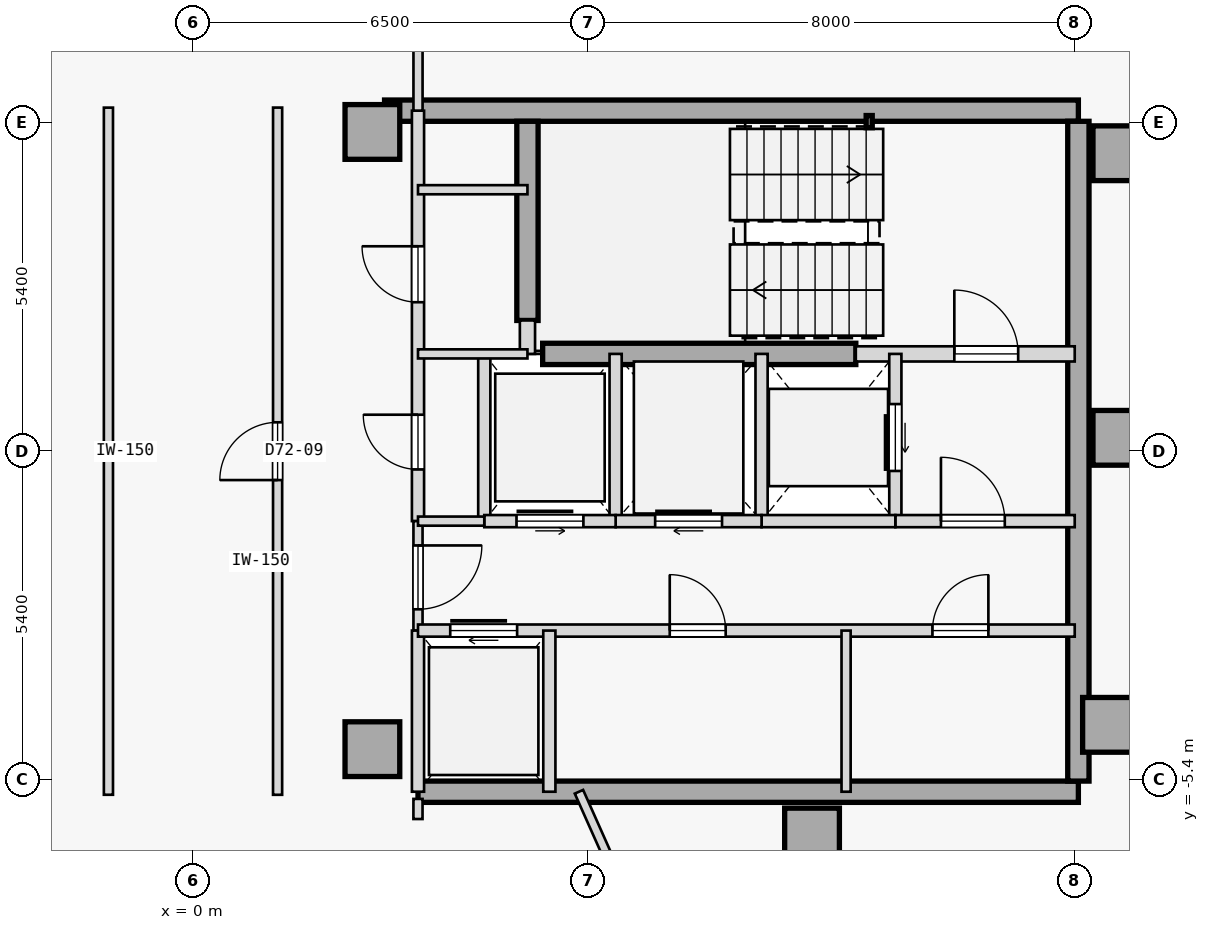
"""IFC4 building model, lengths in metres.
Left out: names, types, materials, properties, quantities, classifications, styles, units other than length and angle.
Written with IfcOpenShell. Run it as: python <this file> out.ifc"""

import sys

from ifc_helpers import new_model, si_unit, direction, frame, frame_2d, origin, origin_2d, place, context, subcontext, project, spatial, rectangle, hollow_rectangle, extrude, element, fill, save


model = new_model("IFC4")
c1 = context("Model", 3, precision=1e-05, world=origin(), true_north=direction((0.0, 1.0)))
c2 = subcontext(c1, "Body", "Model", "MODEL_VIEW")
j1 = project(units=[si_unit("LENGTHUNIT", "METRE"), si_unit("PLANEANGLEUNIT", "RADIAN")], contexts=[c1])
p1 = place(None, origin())
s1 = spatial("IfcSite", under=j1, at=p1, CompositionType="ELEMENT")
p2 = place(p1, origin())
s2 = spatial("IfcBuilding", under=s1, at=p2, CompositionType="ELEMENT")
p3 = place(p2, frame((0.0, 0.0, 268.9)))
s3 = spatial("IfcBuildingStorey", under=s2, at=p3, CompositionType="ELEMENT", Elevation=268.9)
for number, where, z_axis, x_axis in (
    (1, (15.25, 4.9, 0.0), (0.0, 0.0, 1.0), (1.0, 0.0, 0.0)),
    (2, (15.25, 0.22, 0.0), (0.0, 0.0, 1.0), (1.0, 0.0, 0.0)),
    (3, (15.08, -4.5, 0.0), (0.0, 0.0, 1.0), (1.0, 0.0, 0.0)),
    (4, (10.18, -6.32, 0.0), (0.0, 0.0, 1.0), (1.0, 0.0, 0.0)),
    (5, (2.95, -4.9, 0.0), (0.0, 0.0, 1.0), (1.0, 0.0, 0.0)),
    (6, (2.95, 5.25, 0.0), (0.0, 0.0, 1.0), (1.0, 0.0, 0.0)),
):
    element("IfcColumn", number, at=place(p3, frame(where, z_axis=z_axis, x_axis=x_axis)), inside=s3, PredefinedType="COLUMN", context=c2, shape_type="SweptSolid", body=[
        extrude(rectangle(XDim=0.9, YDim=0.9, at=origin_2d()), origin(), (0.0, 0.0, 1.0), 3.35),
    ])
p4 = place(p3, frame((3.15, 5.6, 0.0), z_axis=(0.0, 0.0, 1.0), x_axis=(1.0, 0.0, 0.0)))
e7 = element("IfcWall", 7, at=p4, inside=s3, PredefinedType="SHEAR", context=c2, shape_type="SweptSolid", body=[
    extrude(rectangle(XDim=11.41, YDim=0.35, at=frame_2d((5.705, 0.0))), origin(), (0.0, 0.0, 1.0), 3.125),
])
p5 = place(p3, frame((3.7, -5.6, 0.0), z_axis=(0.0, 0.0, 1.0), x_axis=(1.0, 0.0, 0.0)))
e8 = element("IfcWall", 8, at=p5, inside=s3, PredefinedType="SHEAR", context=c2, shape_type="SweptSolid", body=[
    extrude(rectangle(XDim=10.86, YDim=0.35, at=frame_2d((5.43, 0.0))), origin(), (0.0, 0.0, 1.0), 3.125),
])
p6 = place(p3, frame((14.56, -5.425, 0.0), z_axis=(0.0, 0.0, 1.0), x_axis=(0.0, 1.0, 0.0)))
e9 = element("IfcWall", 9, at=p6, inside=s3, PredefinedType="SHEAR", context=c2, shape_type="SweptSolid", body=[
    extrude(rectangle(XDim=10.85, YDim=0.35, at=frame_2d((5.425, 0.0))), origin(), (0.0, 0.0, 1.0), 3.125),
])
p7 = place(p3, frame((5.5, 2.15, 0.0), z_axis=(0.0, 0.0, 1.0), x_axis=(0.0, 1.0, 0.0)))
e10 = element("IfcWall", 10, at=p7, inside=s3, PredefinedType="SHEAR", context=c2, shape_type="SweptSolid", body=[
    extrude(rectangle(XDim=3.275, YDim=0.35, at=frame_2d((1.638, 0.0))), origin(), (0.0, 0.0, 1.0), 3.125),
])
p8 = place(p3, frame((5.75, 1.6, 0.0), z_axis=(0.0, 0.0, 1.0), x_axis=(1.0, 0.0, 0.0)))
e11 = element("IfcWall", 11, at=p8, inside=s3, PredefinedType="SHEAR", context=c2, shape_type="SweptSolid", body=[
    extrude(rectangle(XDim=5.15, YDim=0.35, at=frame_2d((2.575, 0.0))), origin(), (0.0, 0.0, 1.0), 3.125),
])
p9 = place(p3, frame((11.12, 5.42, 0.0), z_axis=(0.0, 0.0, 1.0), x_axis=(1.0, 0.0, 0.0)))
e12 = element("IfcColumn", 12, at=p9, inside=s3, PredefinedType="COLUMN", context=c2, shape_type="SweptSolid", body=[
    extrude(hollow_rectangle(XDim=0.1, YDim=0.2, WallThickness=0.008, at=origin_2d()), origin(), (0.0, 0.0, 1.0), 3.35),
])
p10 = place(p3, frame((10.9, 1.6, 0.0), z_axis=(0.0, 0.0, 1.0), x_axis=(1.0, 0.0, 0.0)))
e13 = element("IfcWall", 13, at=p10, inside=s3, PredefinedType="STANDARD", context=c2, shape_type="SweptSolid", body=[
    extrude(rectangle(XDim=3.6, YDim=0.25, at=frame_2d((1.8, 0.0))), origin(), (0.0, 0.0, 1.0), 3.125),
])
p11 = place(p10, frame((1.62, 0.0, 0.0)))
e14 = element("IfcOpeningElement", 14, at=p11, cuts=e13, PredefinedType="OPENING", context=c2, shape_type="SweptSolid", body=[
    extrude(rectangle(XDim=1.05, YDim=2.15, at=frame_2d((0.525, 1.075))), frame((0.0, 0.135, 0.0), z_axis=(0.0, -1.0, 0.0), x_axis=(1.0, 0.0, 0.0)), (0.0, 0.0, 1.0), 0.27),
])
p12 = place(p3, frame((5.5, 1.6, 0.0), z_axis=(0.0, 0.0, 1.0), x_axis=(0.0, 1.0, 0.0)))
e15 = element("IfcWall", 15, at=p12, inside=s3, PredefinedType="STANDARD", context=c2, shape_type="SweptSolid", body=[
    extrude(rectangle(XDim=0.55, YDim=0.25, at=frame_2d((0.275, 0.0))), origin(), (0.0, 0.0, 1.0), 3.125),
])
p13 = place(p3, frame((3.7, -1.15, 0.0), z_axis=(0.0, 0.0, 1.0), x_axis=(0.0, 1.0, 0.0)))
e16 = element("IfcWall", 16, at=p13, inside=s3, PredefinedType="STANDARD", context=c2, shape_type="SweptSolid", body=[
    extrude(rectangle(XDim=6.75, YDim=0.2, at=frame_2d((3.375, 0.0))), origin(), (0.0, 0.0, 1.0), 3.125),
])
p14 = place(p13, frame((3.6, 0.0, 0.0)))
e17 = element("IfcOpeningElement", 17, at=p14, cuts=e16, PredefinedType="OPENING", context=c2, shape_type="SweptSolid", body=[
    extrude(rectangle(XDim=0.92, YDim=2.15, at=frame_2d((0.46, 1.075))), frame((0.0, 0.11, 0.0), z_axis=(0.0, -1.0, 0.0), x_axis=(1.0, 0.0, 0.0)), (0.0, 0.0, 1.0), 0.22),
])
p15 = place(p13, frame((0.85, 0.0, 0.0)))
e18 = element("IfcOpeningElement", 18, at=p15, cuts=e16, PredefinedType="OPENING", context=c2, shape_type="SweptSolid", body=[
    extrude(rectangle(XDim=0.9, YDim=2.15, at=frame_2d((0.45, 1.075))), frame((0.0, 0.11, 0.0), z_axis=(0.0, -1.0, 0.0), x_axis=(1.0, 0.0, 0.0)), (0.0, 0.0, 1.0), 0.22),
])
p16 = place(p3, frame((3.7, -2.95, 0.0), z_axis=(0.0, 0.0, 1.0), x_axis=(0.0, 1.0, 0.0)))
e19 = element("IfcWall", 19, at=p16, inside=s3, PredefinedType="PARTITIONING", context=c2, shape_type="SweptSolid", body=[
    extrude(rectangle(XDim=1.8, YDim=0.15, at=frame_2d((0.9, 0.0))), origin(), (0.0, 0.0, 1.0), 3.125),
])
p17 = place(p16, frame((0.35, 0.0, 0.0)))
e20 = element("IfcOpeningElement", 20, at=p17, cuts=e19, PredefinedType="OPENING", context=c2, shape_type="SweptSolid", body=[
    extrude(rectangle(XDim=1.05, YDim=2.18, at=frame_2d((0.525, 1.09))), frame((0.0, 0.085, 0.0), z_axis=(0.0, -1.0, 0.0), x_axis=(1.0, 0.0, 0.0)), (0.0, 0.0, 1.0), 0.17),
])
p18 = place(p3, frame((3.7, -5.6, 0.0), z_axis=(0.0, 0.0, 1.0), x_axis=(0.0, 1.0, 0.0)))
e21 = element("IfcWall", 21, at=p18, inside=s3, PredefinedType="STANDARD", context=c2, shape_type="SweptSolid", body=[
    extrude(rectangle(XDim=2.65, YDim=0.2, at=frame_2d((1.325, 0.0))), origin(), (0.0, 0.0, 1.0), 3.125),
])
p19 = place(p3, frame((11.55, -1.15, 0.0), z_axis=(0.0, 0.0, 1.0), x_axis=(0.0, 1.0, 0.0)))
e22 = element("IfcWall", 22, at=p19, inside=s3, PredefinedType="STANDARD", context=c2, shape_type="SweptSolid", body=[
    extrude(rectangle(XDim=2.75, YDim=0.2, at=frame_2d((1.375, 0.0))), origin(), (0.0, 0.0, 1.0), 3.125),
])
p20 = place(p19, frame((0.825, 0.0, 0.0)))
e23 = element("IfcOpeningElement", 23, at=p20, cuts=e22, PredefinedType="OPENING", context=c2, shape_type="SweptSolid", body=[
    extrude(rectangle(XDim=1.1, YDim=2.15, at=frame_2d((0.55, 1.075))), frame((0.0, 0.11, 0.0), z_axis=(0.0, -1.0, 0.0), x_axis=(1.0, 0.0, 0.0)), (0.0, 0.0, 1.0), 0.22),
])
p21 = place(p3, frame((9.35, -1.15, 0.0), z_axis=(0.0, 0.0, 1.0), x_axis=(0.0, 1.0, 0.0)))
e24 = element("IfcWall", 24, at=p21, inside=s3, PredefinedType="STANDARD", context=c2, shape_type="SweptSolid", body=[
    extrude(rectangle(XDim=2.75, YDim=0.2, at=frame_2d((1.375, 0.0))), origin(), (0.0, 0.0, 1.0), 3.125),
])
p22 = place(p3, frame((11.55, -1.15, 0.0), z_axis=(0.0, 0.0, 1.0), x_axis=(1.0, 0.0, 0.0)))
e25 = element("IfcWall", 25, at=p22, inside=s3, PredefinedType="STANDARD", context=c2, shape_type="SweptSolid", body=[
    extrude(rectangle(XDim=2.95, YDim=0.2, at=frame_2d((1.475, 0.0))), origin(), (0.0, 0.0, 1.0), 3.125),
])
p23 = place(p22, frame((0.75, 0.0, 0.0)))
e26 = element("IfcOpeningElement", 26, at=p23, cuts=e25, PredefinedType="OPENING", context=c2, shape_type="SweptSolid", body=[
    extrude(rectangle(XDim=1.05, YDim=2.18, at=frame_2d((0.525, 1.09))), frame((0.0, 0.11, 0.0), z_axis=(0.0, -1.0, 0.0), x_axis=(1.0, 0.0, 0.0)), (0.0, 0.0, 1.0), 0.22),
])
p24 = place(p3, frame((9.35, -1.15, 0.0), z_axis=(0.0, 0.0, 1.0), x_axis=(1.0, 0.0, 0.0)))
e27 = element("IfcWall", 27, at=p24, inside=s3, PredefinedType="STANDARD", context=c2, shape_type="SweptSolid", body=[
    extrude(rectangle(XDim=2.2, YDim=0.2, at=frame_2d((1.1, 0.0))), origin(), (0.0, 0.0, 1.0), 3.125),
])
p25 = place(p3, frame((6.95, -1.15, 0.0), z_axis=(0.0, 0.0, 1.0), x_axis=(0.0, 1.0, 0.0)))
e28 = element("IfcWall", 28, at=p25, inside=s3, PredefinedType="STANDARD", context=c2, shape_type="SweptSolid", body=[
    extrude(rectangle(XDim=2.75, YDim=0.2, at=frame_2d((1.375, 0.0))), origin(), (0.0, 0.0, 1.0), 3.125),
])
p26 = place(p3, frame((6.95, -1.15, 0.0), z_axis=(0.0, 0.0, 1.0), x_axis=(1.0, 0.0, 0.0)))
e29 = element("IfcWall", 29, at=p26, inside=s3, PredefinedType="STANDARD", context=c2, shape_type="SweptSolid", body=[
    extrude(rectangle(XDim=2.4, YDim=0.2, at=frame_2d((1.2, 0.0))), origin(), (0.0, 0.0, 1.0), 3.125),
])
p27 = place(p26, frame((0.65, 0.0, 0.0)))
e30 = element("IfcOpeningElement", 30, at=p27, cuts=e29, PredefinedType="OPENING", context=c2, shape_type="SweptSolid", body=[
    extrude(rectangle(XDim=1.1, YDim=2.15, at=frame_2d((0.55, 1.075))), frame((0.0, 0.11, 0.0), z_axis=(0.0, -1.0, 0.0), x_axis=(1.0, 0.0, 0.0)), (0.0, 0.0, 1.0), 0.22),
])
p28 = place(p3, frame((4.79, -1.15, 0.0), z_axis=(0.0, 0.0, 1.0), x_axis=(0.0, 1.0, 0.0)))
e31 = element("IfcWall", 31, at=p28, inside=s3, PredefinedType="STANDARD", context=c2, shape_type="SweptSolid", body=[
    extrude(rectangle(XDim=2.75, YDim=0.2, at=frame_2d((1.375, 0.0))), origin(), (0.0, 0.0, 1.0), 3.125),
])
p29 = place(p3, frame((4.79, -1.15, 0.0), z_axis=(0.0, 0.0, 1.0), x_axis=(1.0, 0.0, 0.0)))
e32 = element("IfcWall", 32, at=p29, inside=s3, PredefinedType="STANDARD", context=c2, shape_type="SweptSolid", body=[
    extrude(rectangle(XDim=2.16, YDim=0.2, at=frame_2d((1.08, 0.0))), origin(), (0.0, 0.0, 1.0), 3.125),
])
p30 = place(p29, frame((0.53, 0.0, 0.0)))
e33 = element("IfcOpeningElement", 33, at=p30, cuts=e32, PredefinedType="OPENING", context=c2, shape_type="SweptSolid", body=[
    extrude(rectangle(XDim=1.1, YDim=2.15, at=frame_2d((0.55, 1.075))), frame((0.0, 0.11, 0.0), z_axis=(0.0, -1.0, 0.0), x_axis=(1.0, 0.0, 0.0)), (0.0, 0.0, 1.0), 0.22),
])
p31 = place(p3, frame((3.7, -1.15, 0.0), z_axis=(0.0, 0.0, 1.0), x_axis=(1.0, 0.0, 0.0)))
e34 = element("IfcWall", 34, at=p31, inside=s3, PredefinedType="PARTITIONING", context=c2, shape_type="SweptSolid", body=[
    extrude(rectangle(XDim=1.09, YDim=0.15, at=frame_2d((0.545, 0.0))), origin(), (0.0, 0.0, 1.0), 3.125),
])
p32 = place(p3, frame((3.7, -2.95, 0.0), z_axis=(0.0, 0.0, 1.0), x_axis=(1.0, 0.0, 0.0)))
e35 = element("IfcWall", 35, at=p32, inside=s3, PredefinedType="STANDARD", context=c2, shape_type="SweptSolid", body=[
    extrude(rectangle(XDim=10.8, YDim=0.2, at=frame_2d((5.4, 0.0))), origin(), (0.0, 0.0, 1.0), 3.125),
])
p33 = place(p32, frame((0.53, 0.0, 0.0)))
e36 = element("IfcOpeningElement", 36, at=p33, cuts=e35, PredefinedType="OPENING", context=c2, shape_type="SweptSolid", body=[
    extrude(rectangle(XDim=1.1, YDim=2.15, at=frame_2d((0.55, 1.075))), frame((0.0, 0.11, 0.0), z_axis=(0.0, -1.0, 0.0), x_axis=(1.0, 0.0, 0.0)), (0.0, 0.0, 1.0), 0.22),
])
p34 = place(p32, frame((4.14, 0.0, 0.0)))
e37 = element("IfcOpeningElement", 37, at=p34, cuts=e35, PredefinedType="OPENING", context=c2, shape_type="SweptSolid", body=[
    extrude(rectangle(XDim=0.92, YDim=2.15, at=frame_2d((0.46, 1.075))), frame((0.0, 0.11, 0.0), z_axis=(0.0, -1.0, 0.0), x_axis=(1.0, 0.0, 0.0)), (0.0, 0.0, 1.0), 0.22),
])
p35 = place(p32, frame((8.46, 0.0, 0.0)))
e38 = element("IfcOpeningElement", 38, at=p35, cuts=e35, PredefinedType="OPENING", context=c2, shape_type="SweptSolid", body=[
    extrude(rectangle(XDim=0.92, YDim=2.15, at=frame_2d((0.46, 1.075))), frame((0.0, 0.11, 0.0), z_axis=(0.0, -1.0, 0.0), x_axis=(1.0, 0.0, 0.0)), (0.0, 0.0, 1.0), 0.22),
])
p36 = place(p3, frame((5.86, -5.6, 0.0), z_axis=(0.0, 0.0, 1.0), x_axis=(0.0, 1.0, 0.0)))
e39 = element("IfcWall", 39, at=p36, inside=s3, PredefinedType="STANDARD", context=c2, shape_type="SweptSolid", body=[
    extrude(rectangle(XDim=2.65, YDim=0.2, at=frame_2d((1.325, 0.0))), origin(), (0.0, 0.0, 1.0), 3.125),
])
p37 = place(p3, frame((10.74, -5.6, 0.0), z_axis=(0.0, 0.0, 1.0), x_axis=(0.0, 1.0, 0.0)))
e40 = element("IfcWall", 40, at=p37, inside=s3, PredefinedType="PARTITIONING", context=c2, shape_type="SweptSolid", body=[
    extrude(rectangle(XDim=2.65, YDim=0.15, at=frame_2d((1.325, 0.0))), origin(), (0.0, 0.0, 1.0), 3.125),
])
for number, where, z_axis, x_axis in (
    (41, (3.7, 4.3, 0.0), (0.0, 0.0, 1.0), (1.0, 0.0, 0.0)),
    (42, (3.7, 1.6, 0.0), (0.0, 0.0, 1.0), (1.0, 0.0, 0.0)),
):
    element("IfcWall", number, at=place(p3, frame(where, z_axis=z_axis, x_axis=x_axis)), inside=s3, PredefinedType="PARTITIONING", context=c2, shape_type="SweptSolid", body=[
        extrude(rectangle(XDim=1.8, YDim=0.15, at=frame_2d((0.9, 0.0))), origin(), (0.0, 0.0, 1.0), 3.125),
    ])
p38 = place(p3, frame((-1.391, -5.65, 0.0), z_axis=(0.0, 0.0, 1.0), x_axis=(-2.1605738e-05, 0.999999999767, 0.0)))
e43 = element("IfcWall", 43, at=p38, inside=s3, PredefinedType="PARTITIONING", context=c2, shape_type="SweptSolid", body=[
    extrude(rectangle(XDim=11.3, YDim=0.15, at=frame_2d((5.65, 0.0))), origin(), (0.0, 0.0, 1.0), 3.125),
])
p39 = place(p3, frame((1.391, -5.65, 0.0), z_axis=(0.0, 0.0, 1.0), x_axis=(4.3206809e-05, 0.999999999067, 0.0)))
e44 = element("IfcWall", 44, at=p39, inside=s3, PredefinedType="PARTITIONING", context=c2, shape_type="SweptSolid", body=[
    extrude(rectangle(XDim=11.301, YDim=0.15, at=frame_2d((5.65, 0.0))), origin(), (0.0, 0.0, 1.0), 3.125),
])
p40 = place(p39, frame((5.176, 0.0, 0.0)))
e45 = element("IfcOpeningElement", 45, at=p40, cuts=e44, PredefinedType="OPENING", context=c2, shape_type="SweptSolid", body=[
    extrude(rectangle(XDim=0.95, YDim=2.15, at=frame_2d((0.475, 1.075))), frame((0.0, 0.085, 0.0), z_axis=(0.0, -1.0, 0.0), x_axis=(1.0, 0.0, 0.0)), (0.0, 0.0, 1.0), 0.17),
])
p41 = place(p3, frame((3.699, -6.049, 0.0), z_axis=(0.0, 0.0, 1.0), x_axis=(0.001476013152, 0.999998910692, 0.0)))
e46 = element("IfcWall", 46, at=p41, inside=s3, PredefinedType="PARTITIONING", context=c2, shape_type="SweptSolid", body=[
    extrude(rectangle(XDim=0.331, YDim=0.15, at=frame_2d((0.166, 0.0))), origin(), (0.0, 0.0, 1.0), 3.125),
])
p42 = place(p3, frame((3.7, 5.601, 0.0), z_axis=(0.0, 0.0, 1.0), x_axis=(0.0, 1.0, 0.0)))
e47 = element("IfcWall", 47, at=p42, inside=s3, PredefinedType="PARTITIONING", context=c2, shape_type="SweptSolid", body=[
    extrude(rectangle(XDim=3.713, YDim=0.15, at=frame_2d((1.856, 0.0))), origin(), (0.0, 0.0, 1.0), 3.125),
])
p43 = place(p42, frame((1.396, 0.0, 0.0)))
e48 = element("IfcOpeningElement", 48, at=p43, cuts=e47, PredefinedType="OPENING", context=c2, shape_type="SweptSolid", body=[
    extrude(rectangle(XDim=0.92, YDim=2.15, at=frame_2d((0.46, 1.075))), frame((0.0, 0.085, 0.0), z_axis=(0.0, -1.0, 0.0), x_axis=(1.0, 0.0, 0.0)), (0.0, 0.0, 1.0), 0.17),
])
p44 = place(p3, frame((7.696, -8.63, 0.0), z_axis=(0.0, 0.0, 1.0), x_axis=(-0.406773661192, 0.913528975217, 0.0)))
e49 = element("IfcWall", 49, at=p44, inside=s3, PredefinedType="PARTITIONING", context=c2, shape_type="SweptSolid", body=[
    extrude(rectangle(XDim=3.316, YDim=0.15, at=frame_2d((1.658, 0.0))), origin(), (0.0, 0.0, 1.0), 3.125),
])
p45 = place(p11, origin())
e50 = element("IfcDoor", 50, at=p45, inside=s3, OperationType="SINGLE_SWING_LEFT", PredefinedType="DOOR", context=c2, shape_type="SweptSolid", body=[
    extrude(rectangle(XDim=1.05, YDim=2.15, at=frame_2d((0.525, 1.075))), frame((0.0, 0.025, 0.0), z_axis=(0.0, -1.0, 0.0), x_axis=(1.0, 0.0, 0.0)), (0.0, 0.0, 1.0), 0.05),
])
fill(e14, e50)
p46 = place(p23, origin())
e51 = element("IfcDoor", 51, at=p46, inside=s3, OperationType="SINGLE_SWING_LEFT", PredefinedType="DOOR", context=c2, shape_type="SweptSolid", body=[
    extrude(rectangle(XDim=1.05, YDim=2.18, at=frame_2d((0.525, 1.09))), frame((0.0, 0.025, 0.0), z_axis=(0.0, -1.0, 0.0), x_axis=(1.0, 0.0, 0.0)), (0.0, 0.0, 1.0), 0.05),
])
fill(e26, e51)
p47 = place(p17, frame((1.05, 0.0, 0.0), z_axis=(0.0, 0.0, 1.0), x_axis=(-1.0, 0.0, 0.0)))
e52 = element("IfcDoor", 52, at=p47, inside=s3, OperationType="SINGLE_SWING_RIGHT", PredefinedType="DOOR", context=c2, shape_type="SweptSolid", body=[
    extrude(rectangle(XDim=1.05, YDim=2.18, at=frame_2d((0.525, 1.09))), frame((0.0, 0.025, 0.0), z_axis=(0.0, -1.0, 0.0), x_axis=(1.0, 0.0, 0.0)), (0.0, 0.0, 1.0), 0.05),
])
fill(e20, e52)
p48 = place(p20, origin())
e53 = element("IfcDoor", 53, at=p48, inside=s3, OperationType="SLIDING_TO_RIGHT", PredefinedType="DOOR", context=c2, shape_type="SweptSolid", body=[
    extrude(rectangle(XDim=1.1, YDim=2.15, at=frame_2d((0.55, 1.075))), frame((0.0, 0.025, 0.0), z_axis=(0.0, -1.0, 0.0), x_axis=(1.0, 0.0, 0.0)), (0.0, 0.0, 1.0), 0.05),
])
fill(e23, e53)
p49 = place(p27, origin())
e54 = element("IfcDoor", 54, at=p49, inside=s3, OperationType="SLIDING_TO_RIGHT", PredefinedType="DOOR", context=c2, shape_type="SweptSolid", body=[
    extrude(rectangle(XDim=1.1, YDim=2.15, at=frame_2d((0.55, 1.075))), frame((0.0, 0.025, 0.0), z_axis=(0.0, -1.0, 0.0), x_axis=(1.0, 0.0, 0.0)), (0.0, 0.0, 1.0), 0.05),
])
fill(e30, e54)
p50 = place(p30, origin())
e55 = element("IfcDoor", 55, at=p50, inside=s3, OperationType="SLIDING_TO_LEFT", PredefinedType="DOOR", context=c2, shape_type="SweptSolid", body=[
    extrude(rectangle(XDim=1.1, YDim=2.15, at=frame_2d((0.55, 1.075))), frame((0.0, 0.025, 0.0), z_axis=(0.0, -1.0, 0.0), x_axis=(1.0, 0.0, 0.0)), (0.0, 0.0, 1.0), 0.05),
])
fill(e33, e55)
p51 = place(p33, origin())
e56 = element("IfcDoor", 56, at=p51, inside=s3, OperationType="SLIDING_TO_RIGHT", PredefinedType="DOOR", context=c2, shape_type="SweptSolid", body=[
    extrude(rectangle(XDim=1.1, YDim=2.15, at=frame_2d((0.55, 1.075))), frame((0.0, 0.025, 0.0), z_axis=(0.0, -1.0, 0.0), x_axis=(1.0, 0.0, 0.0)), (0.0, 0.0, 1.0), 0.05),
])
fill(e36, e56)
p52 = place(p34, origin())
e57 = element("IfcDoor", 57, at=p52, inside=s3, OperationType="SINGLE_SWING_LEFT", PredefinedType="DOOR", context=c2, shape_type="SweptSolid", body=[
    extrude(rectangle(XDim=0.92, YDim=2.15, at=frame_2d((0.46, 1.075))), frame((0.0, 0.025, 0.0), z_axis=(0.0, -1.0, 0.0), x_axis=(1.0, 0.0, 0.0)), (0.0, 0.0, 1.0), 0.05),
])
fill(e37, e57)
p53 = place(p35, origin())
e58 = element("IfcDoor", 58, at=p53, inside=s3, OperationType="SINGLE_SWING_RIGHT", PredefinedType="DOOR", context=c2, shape_type="SweptSolid", body=[
    extrude(rectangle(XDim=0.92, YDim=2.15, at=frame_2d((0.46, 1.075))), frame((0.0, 0.025, 0.0), z_axis=(0.0, -1.0, 0.0), x_axis=(1.0, 0.0, 0.0)), (0.0, 0.0, 1.0), 0.05),
])
fill(e38, e58)
p54 = place(p14, origin())
e59 = element("IfcDoor", 59, at=p54, inside=s3, OperationType="SINGLE_SWING_RIGHT", PredefinedType="DOOR", context=c2, shape_type="SweptSolid", body=[
    extrude(rectangle(XDim=0.92, YDim=2.15, at=frame_2d((0.46, 1.075))), frame((0.0, 0.025, 0.0), z_axis=(0.0, -1.0, 0.0), x_axis=(1.0, 0.0, 0.0)), (0.0, 0.0, 1.0), 0.05),
])
fill(e17, e59)
p55 = place(p15, origin())
e60 = element("IfcDoor", 60, at=p55, inside=s3, OperationType="SINGLE_SWING_RIGHT", PredefinedType="DOOR", context=c2, shape_type="SweptSolid", body=[
    extrude(rectangle(XDim=0.9, YDim=2.15, at=frame_2d((0.45, 1.075))), frame((0.0, 0.025, 0.0), z_axis=(0.0, -1.0, 0.0), x_axis=(1.0, 0.0, 0.0)), (0.0, 0.0, 1.0), 0.05),
])
fill(e18, e60)
p56 = place(p40, origin())
e61 = element("IfcDoor", 61, at=p56, inside=s3, OperationType="SINGLE_SWING_LEFT", PredefinedType="DOOR", context=c2, shape_type="SweptSolid", body=[
    extrude(rectangle(XDim=0.95, YDim=2.15, at=frame_2d((0.475, 1.075))), frame((0.0, 0.025, 0.0), z_axis=(0.0, -1.0, 0.0), x_axis=(1.0, 0.0, 0.0)), (0.0, 0.0, 1.0), 0.05),
])
fill(e45, e61)
save(model, sys.argv[1])
